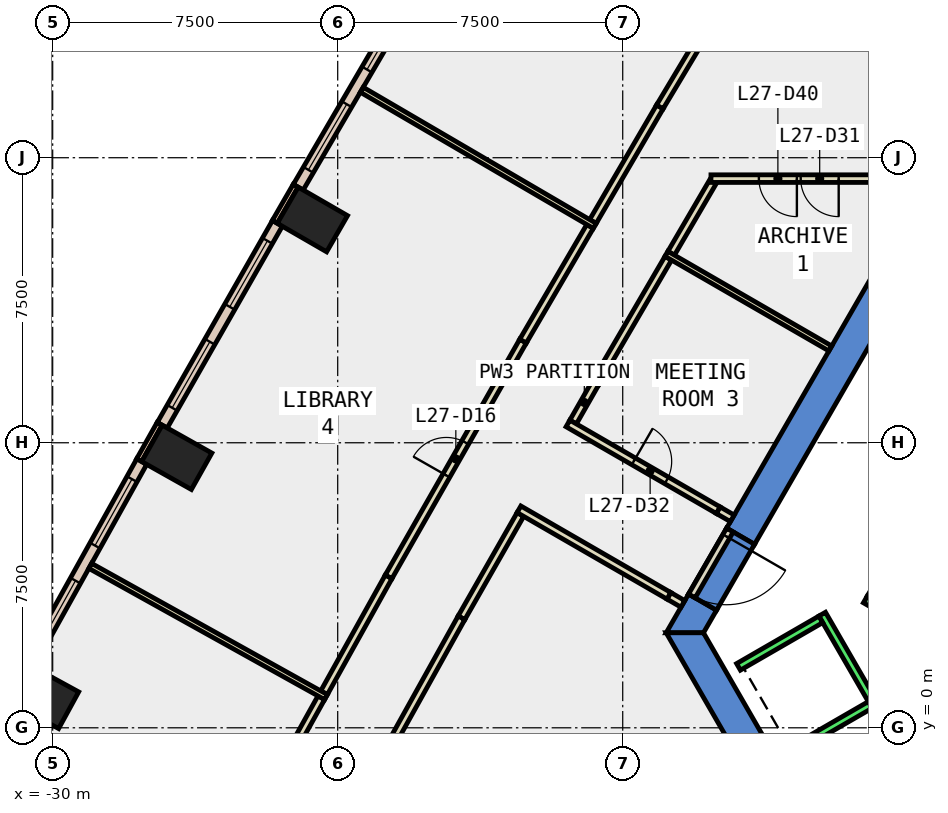
"""IFC4 building model, lengths in metres.
Left out: names, types, materials, properties, quantities, classifications, styles, units other than length and angle.
Written with IfcOpenShell. Run it as: python <this file> out.ifc"""

import sys

from ifc_helpers import new_model, si_unit, direction, frame, frame_2d, origin, origin_2d, place, context, subcontext, project, spatial, polyline, rectangle, outline, extrude, element, fill, save


model = new_model("IFC4")
c1 = context("Model", 3, precision=1e-05, world=origin(), true_north=direction((0.0, 1.0)))
c2 = subcontext(c1, "Body", "Model", "MODEL_VIEW")
j1 = project(units=[si_unit("LENGTHUNIT", "METRE"), si_unit("PLANEANGLEUNIT", "RADIAN")], contexts=[c1])
p1 = place(None, origin())
s1 = spatial("IfcSite", under=j1, at=p1, CompositionType="ELEMENT")
p2 = place(p1, origin())
s2 = spatial("IfcBuilding", under=s1, at=p2, CompositionType="ELEMENT")
p3 = place(p2, frame((0.0, 0.0, 124.4)))
s3 = spatial("IfcBuildingStorey", under=s2, at=p3, CompositionType="ELEMENT", Elevation=124.4)
for number, where, z_axis, x_axis in (
    (1, (-23.166, 13.375, -0.4), (0.0, 0.0, 1.0), (0.5, 0.866, 0.0)),
    (2, (-26.735, 7.117, -0.4), (0.0, 0.0, 1.0), (0.49, 0.872, 0.0)),
    (3, (-30.238, 0.822, -0.4), (0.0, 0.0, 1.0), (0.48, 0.877, 0.0)),
):
    element("IfcColumn", number, at=place(p3, frame(where, z_axis=z_axis, x_axis=x_axis)), inside=s3, PredefinedType="COLUMN", context=c2, shape_type="SweptSolid", body=[
        extrude(rectangle(XDim=1.1, YDim=1.5, at=origin_2d()), origin(), (0.0, 0.0, 1.0), 4.2),
    ])
p4 = place(p3, frame((0.0, 0.0, -0.4)))
e4 = element("IfcWall", 4, at=p4, inside=s3, PredefinedType="SHEAR", context=c2, shape_type="SweptSolid", body=[
    extrude(outline(polyline([(-12.267, 5.252), (-11.531, 4.827), (-6.437, 13.65), (-6.928, 14.5), (-12.267, 5.252)])), origin(), (0.0, 0.0, 1.0), 4.2),
])
p5 = place(p3, frame((0.0, 0.0, -0.4)))
e5 = element("IfcWall", 5, at=p5, inside=s3, PredefinedType="SHEAR", context=c2, shape_type="SweptSolid", body=[
    extrude(outline(polyline([(-12.531, 3.095), (-13.267, 3.52), (-13.856, 2.5), (-12.875, 2.5), (-12.531, 3.095)])), origin(), (0.0, 0.0, 1.0), 4.2),
])
p6 = place(p3, frame((0.0, 0.0, 3.6)))
e6 = element("IfcWall", 6, at=p6, inside=s3, PredefinedType="SHEAR", context=c2, shape_type="SweptSolid", body=[
    extrude(outline(polyline([(-13.267, 3.52), (-12.531, 3.095), (-11.531, 4.827), (-12.267, 5.252), (-13.267, 3.52)])), origin(), (0.0, 0.0, 1.0), 0.2),
])
p7 = place(p3, frame((0.0, 0.0, -0.4)))
e7 = element("IfcWall", 7, at=p7, inside=s3, PredefinedType="SHEAR", context=c2, shape_type="SweptSolid", body=[
    extrude(outline(polyline([(-13.856, 2.5), (-6.928, -9.5), (-6.437, -8.65), (-12.875, 2.5), (-13.856, 2.5)])), origin(), (0.0, 0.0, 1.0), 4.2),
])
p8 = place(p3, frame((-23.605, 14.264, 0.0), z_axis=(0.0, 0.0, 1.0), x_axis=(-0.499933745558, -0.866063652425, 0.0)))
e8 = element("IfcWall", 8, at=p8, inside=s3, PredefinedType="STANDARD", context=c2, shape_type="SweptSolid", body=[
    extrude(rectangle(XDim=1.1, YDim=0.15, at=frame_2d((0.55, 0.0))), origin(), (0.0, 0.0, 1.0), 3.8),
])
p9 = place(p3, frame((-27.185, 8.001, 0.0), z_axis=(0.0, 0.0, 1.0), x_axis=(-0.490008344094, -0.871717742574, 0.0)))
e9 = element("IfcWall", 9, at=p9, inside=s3, PredefinedType="STANDARD", context=c2, shape_type="SweptSolid", body=[
    extrude(rectangle(XDim=1.1, YDim=0.15, at=frame_2d((0.55, 0.0))), origin(), (0.0, 0.0, 1.0), 3.8),
])
p10 = place(p3, frame((-20.454, 19.503, 0.0), z_axis=(0.0, 0.0, 1.0), x_axis=(-0.504441987427, -0.863445586775, 0.0)))
e10 = element("IfcWall", 10, at=p10, inside=s3, PredefinedType="STANDARD", context=c2, shape_type="SweptSolid", body=[
    extrude(rectangle(XDim=6.114, YDim=0.3, at=frame_2d((3.057, 0.0))), origin(), (0.0, 0.0, 1.0), 3.8),
])
p11 = place(p10, frame((0.528, 0.0, 0.9)))
e11 = element("IfcOpeningElement", 11, at=p11, cuts=e10, PredefinedType="OPENING", context=c2, shape_type="SweptSolid", body=[
    extrude(rectangle(XDim=2.0, YDim=2.6, at=frame_2d((1.0, 1.3))), frame((0.0, 0.16, 0.0), z_axis=(0.0, -1.0, 0.0), x_axis=(1.0, 0.0, 0.0)), (0.0, 0.0, 1.0), 0.32),
])
p12 = place(p10, frame((3.585, 0.0, 0.9)))
e12 = element("IfcOpeningElement", 12, at=p12, cuts=e10, PredefinedType="OPENING", context=c2, shape_type="SweptSolid", body=[
    extrude(rectangle(XDim=2.0, YDim=2.6, at=frame_2d((1.0, 1.3))), frame((0.0, 0.16, 0.0), z_axis=(0.0, -1.0, 0.0), x_axis=(1.0, 0.0, 0.0)), (0.0, 0.0, 1.0), 0.32),
])
p13 = place(p3, frame((-24.087, 13.273, 0.0), z_axis=(0.0, 0.0, 1.0), x_axis=(-0.495472401298, -0.868623681206, 0.0)))
e13 = element("IfcWall", 13, at=p13, inside=s3, PredefinedType="STANDARD", context=c2, shape_type="SweptSolid", body=[
    extrude(rectangle(XDim=6.115, YDim=0.3, at=frame_2d((3.058, 0.0))), origin(), (0.0, 0.0, 1.0), 3.8),
])
p14 = place(p13, frame((0.529, 0.0, 0.9)))
e14 = element("IfcOpeningElement", 14, at=p14, cuts=e13, PredefinedType="OPENING", context=c2, shape_type="SweptSolid", body=[
    extrude(rectangle(XDim=2.0, YDim=2.6, at=frame_2d((1.0, 1.3))), frame((0.0, 0.16, 0.0), z_axis=(0.0, -1.0, 0.0), x_axis=(1.0, 0.0, 0.0)), (0.0, 0.0, 1.0), 0.32),
])
p15 = place(p13, frame((3.587, 0.0, 0.9)))
e15 = element("IfcOpeningElement", 15, at=p15, cuts=e13, PredefinedType="OPENING", context=c2, shape_type="SweptSolid", body=[
    extrude(rectangle(XDim=2.0, YDim=2.6, at=frame_2d((1.0, 1.3))), frame((0.0, 0.16, 0.0), z_axis=(0.0, -1.0, 0.0), x_axis=(1.0, 0.0, 0.0)), (0.0, 0.0, 1.0), 0.32),
])
p16 = place(p3, frame((-27.656, 7.005, 0.0), z_axis=(0.0, 0.0, 1.0), x_axis=(-0.486229342917, -0.873831234327, 0.0)))
e16 = element("IfcWall", 16, at=p16, inside=s3, PredefinedType="STANDARD", context=c2, shape_type="SweptSolid", body=[
    extrude(rectangle(XDim=6.114, YDim=0.3, at=frame_2d((3.057, 0.0))), origin(), (0.0, 0.0, 1.0), 3.8),
])
p17 = place(p16, frame((0.529, 0.0, 0.9)))
e17 = element("IfcOpeningElement", 17, at=p17, cuts=e16, PredefinedType="OPENING", context=c2, shape_type="SweptSolid", body=[
    extrude(rectangle(XDim=2.0, YDim=2.6, at=frame_2d((1.0, 1.3))), frame((0.0, 0.16, 0.0), z_axis=(0.0, -1.0, 0.0), x_axis=(1.0, 0.0, 0.0)), (0.0, 0.0, 1.0), 0.32),
])
p18 = place(p16, frame((3.586, 0.0, 0.9)))
e18 = element("IfcOpeningElement", 18, at=p18, cuts=e16, PredefinedType="OPENING", context=c2, shape_type="SweptSolid", body=[
    extrude(rectangle(XDim=2.0, YDim=2.6, at=frame_2d((1.0, 1.3))), frame((0.0, 0.16, 0.0), z_axis=(0.0, -1.0, 0.0), x_axis=(1.0, 0.0, 0.0)), (0.0, 0.0, 1.0), 0.32),
])
p19 = place(p3, frame((-12.628, 14.364, 0.0), z_axis=(0.0, 0.0, 1.0), x_axis=(-0.504457175129, -0.863436713639, 0.0)))
e19 = element("IfcWall", 19, at=p19, inside=s3, PredefinedType="PARTITIONING", context=c2, shape_type="SweptSolid", body=[
    extrude(rectangle(XDim=2.175, YDim=0.2, at=frame_2d((1.087, 0.0))), origin(), (0.0, 0.0, 1.0), 3.8),
])
p20 = place(p3, frame((-13.801, 12.356, 0.0), z_axis=(0.0, 0.0, 1.0), x_axis=(-0.504282474222, -0.863538757782, 0.0)))
e20 = element("IfcWall", 20, at=p20, inside=s3, PredefinedType="PARTITIONING", context=c2, shape_type="SweptSolid", body=[
    extrude(rectangle(XDim=3.8, YDim=0.2, at=frame_2d((1.9, 0.0))), origin(), (0.0, 0.0, 1.0), 3.8),
])
p21 = place(p3, frame((-15.717, 9.075, 0.0), z_axis=(0.0, 0.0, 1.0), x_axis=(-0.495695496657, -0.868496387208, 0.0)))
e21 = element("IfcWall", 21, at=p21, inside=s3, PredefinedType="PARTITIONING", context=c2, shape_type="SweptSolid", body=[
    extrude(rectangle(XDim=1.186, YDim=0.2, at=frame_2d((0.593, 0.0))), origin(), (0.0, 0.0, 1.0), 3.8),
])
p22 = place(p3, frame((-16.441, 8.008, 0.0), z_axis=(0.0, 0.0, 1.0), x_axis=(0.866020923391, -0.500007760188, 0.0)))
e22 = element("IfcWall", 22, at=p22, inside=s3, PredefinedType="PARTITIONING", context=c2, shape_type="SweptSolid", body=[
    extrude(rectangle(XDim=4.568, YDim=0.2, at=frame_2d((2.284, 0.0))), origin(), (0.0, 0.0, 1.0), 3.8),
])
p23 = place(p22, frame((1.997, 0.0, 0.0)))
e23 = element("IfcOpeningElement", 23, at=p23, cuts=e22, PredefinedType="OPENING", context=c2, shape_type="SweptSolid", body=[
    extrude(rectangle(XDim=1.0, YDim=2.1, at=frame_2d((0.5, 1.05))), frame((0.0, 0.11, 0.0), z_axis=(0.0, -1.0, 0.0), x_axis=(1.0, 0.0, 0.0)), (0.0, 0.0, 1.0), 0.22),
])
p24 = place(p3, frame((-13.417, 3.26, 0.0), z_axis=(0.0, 0.0, 1.0), x_axis=(-0.865544229481, 0.500832493767, 0.0)))
e24 = element("IfcWall", 24, at=p24, inside=s3, PredefinedType="PARTITIONING", context=c2, shape_type="SweptSolid", body=[
    extrude(rectangle(XDim=0.425, YDim=0.2, at=frame_2d((0.212, 0.0))), origin(), (0.0, 0.0, 1.0), 2.4),
])
p25 = place(p3, frame((-17.692, 5.613, 0.0), z_axis=(0.0, 0.0, 1.0), x_axis=(-0.495492055461, -0.868612469963, 0.0)))
e25 = element("IfcWall", 25, at=p25, inside=s3, PredefinedType="PARTITIONING", context=c2, shape_type="SweptSolid", body=[
    extrude(rectangle(XDim=3.13, YDim=0.2, at=frame_2d((1.565, 0.0))), origin(), (0.0, 0.0, 1.0), 3.8),
])
p26 = place(p3, frame((-19.243, 2.894, 0.0), z_axis=(0.0, 0.0, 1.0), x_axis=(-0.486304341235, -0.873789498504, 0.0)))
e26 = element("IfcWall", 26, at=p26, inside=s3, PredefinedType="PARTITIONING", context=c2, shape_type="SweptSolid", body=[
    extrude(rectangle(XDim=7.113, YDim=0.2, at=frame_2d((3.556, 0.0))), origin(), (0.0, 0.0, 1.0), 3.8),
])
p27 = place(p3, frame((-15.784, 13.322, 0.0), z_axis=(0.0, 0.0, 1.0), x_axis=(0.50424043703, 0.863563304954, 0.0)))
e27 = element("IfcWall", 27, at=p27, inside=s3, PredefinedType="PARTITIONING", context=c2, shape_type="SweptSolid", body=[
    extrude(rectangle(XDim=3.492, YDim=0.2, at=frame_2d((1.746, 0.0))), origin(), (0.0, 0.0, 1.0), 3.8),
])
p28 = place(p3, frame((-14.023, 16.338, 0.0), z_axis=(0.0, 0.0, 1.0), x_axis=(0.513773581048, 0.857925816966, 0.0)))
e28 = element("IfcWall", 28, at=p28, inside=s3, PredefinedType="PARTITIONING", context=c2, shape_type="SweptSolid", body=[
    extrude(rectangle(XDim=7.061, YDim=0.2, at=frame_2d((3.531, 0.0))), origin(), (0.0, 0.0, 1.0), 3.8),
])
p29 = place(p28, frame((3.106, 0.0, 0.0)))
e29 = element("IfcOpeningElement", 29, at=p29, cuts=e28, PredefinedType="OPENING", context=c2, shape_type="SweptSolid", body=[
    extrude(rectangle(XDim=1.0, YDim=2.1, at=frame_2d((0.5, 1.05))), frame((0.0, 0.11, 0.0), z_axis=(0.0, -1.0, 0.0), x_axis=(1.0, 0.0, 0.0)), (0.0, 0.0, 1.0), 0.22),
])
p30 = place(p3, frame((-22.859, 0.922, 0.0), z_axis=(0.0, 0.0, 1.0), x_axis=(0.486390484578, 0.873741550181, 0.0)))
e30 = element("IfcWall", 30, at=p30, inside=s3, PredefinedType="PARTITIONING", context=c2, shape_type="SweptSolid", body=[
    extrude(rectangle(XDim=3.493, YDim=0.2, at=frame_2d((1.747, 0.0))), origin(), (0.0, 0.0, 1.0), 3.8),
])
p31 = place(p3, frame((-21.16, 3.974, 0.0), z_axis=(0.0, 0.0, 1.0), x_axis=(0.495450054309, 0.868636427791, 0.0)))
e31 = element("IfcWall", 31, at=p31, inside=s3, PredefinedType="PARTITIONING", context=c2, shape_type="SweptSolid", body=[
    extrude(rectangle(XDim=7.139, YDim=0.2, at=frame_2d((3.569, 0.0))), origin(), (0.0, 0.0, 1.0), 3.8),
])
p32 = place(p31, frame((3.069, 0.0, 0.0)))
e32 = element("IfcOpeningElement", 32, at=p32, cuts=e31, PredefinedType="OPENING", context=c2, shape_type="SweptSolid", body=[
    extrude(rectangle(XDim=1.0, YDim=2.1, at=frame_2d((0.5, 1.05))), frame((0.0, 0.11, 0.0), z_axis=(0.0, -1.0, 0.0), x_axis=(1.0, 0.0, 0.0)), (0.0, 0.0, 1.0), 0.22),
])
p33 = place(p3, frame((-17.623, 10.175, 0.0), z_axis=(0.0, 0.0, 1.0), x_axis=(0.504383407959, 0.863479807393, 0.0)))
e33 = element("IfcWall", 33, at=p33, inside=s3, PredefinedType="PARTITIONING", context=c2, shape_type="SweptSolid", body=[
    extrude(rectangle(XDim=3.495, YDim=0.2, at=frame_2d((1.748, 0.0))), origin(), (0.0, 0.0, 1.0), 3.8),
])
p34 = place(p3, frame((-24.63, -2.262, 0.0), z_axis=(0.0, 0.0, 1.0), x_axis=(0.486058237491, 0.873926421255, 0.0)))
e34 = element("IfcWall", 34, at=p34, inside=s3, PredefinedType="PARTITIONING", context=c2, shape_type="SweptSolid", body=[
    extrude(rectangle(XDim=3.493, YDim=0.2, at=frame_2d((1.747, 0.0))), origin(), (0.0, 0.0, 1.0), 3.8),
])
p35 = place(p3, frame((-9.537, 9.981, 0.0), z_axis=(0.0, 0.0, 1.0), x_axis=(-0.866035377451, 0.499982724704, 0.0)))
e35 = element("IfcWall", 35, at=p35, inside=s3, PredefinedType="PARTITIONING", context=c2, shape_type="SweptSolid", body=[
    extrude(rectangle(XDim=4.98, YDim=0.15, at=frame_2d((2.49, 0.0))), origin(), (0.0, 0.0, 1.0), 3.8),
])
p36 = place(p3, frame((-6.957, 14.45, 0.0), z_axis=(0.0, 0.0, 1.0), x_axis=(-1.0, 0.0, 0.0)))
e36 = element("IfcWall", 36, at=p36, inside=s3, PredefinedType="PARTITIONING", context=c2, shape_type="SweptSolid", body=[
    extrude(rectangle(XDim=5.721, YDim=0.2, at=frame_2d((2.86, 0.0))), origin(), (0.0, 0.0, 1.0), 3.8),
])
p37 = place(p36, frame((2.36, 0.0, 0.0)))
e37 = element("IfcOpeningElement", 37, at=p37, cuts=e36, PredefinedType="OPENING", context=c2, shape_type="SweptSolid", body=[
    extrude(rectangle(XDim=1.0, YDim=2.1, at=frame_2d((0.5, 1.05))), frame((0.0, 0.11, 0.0), z_axis=(0.0, -1.0, 0.0), x_axis=(1.0, 0.0, 0.0)), (0.0, 0.0, 1.0), 0.22),
])
p38 = place(p36, frame((3.46, 0.0, 0.0)))
e38 = element("IfcOpeningElement", 38, at=p38, cuts=e36, PredefinedType="OPENING", context=c2, shape_type="SweptSolid", body=[
    extrude(rectangle(XDim=1.0, YDim=2.1, at=frame_2d((0.5, 1.05))), frame((0.0, 0.11, 0.0), z_axis=(0.0, -1.0, 0.0), x_axis=(1.0, 0.0, 0.0)), (0.0, 0.0, 1.0), 0.22),
])
p39 = place(p3, frame((-15.736, 13.207, 0.0), z_axis=(0.0, 0.0, 1.0), x_axis=(-0.863454426155, 0.504426856892, 0.0)))
e39 = element("IfcWall", 39, at=p39, inside=s3, PredefinedType="PARTITIONING", context=c2, shape_type="SweptSolid", body=[
    extrude(rectangle(XDim=7.099, YDim=0.15, at=frame_2d((3.55, 0.0))), origin(), (0.0, 0.0, 1.0), 3.8),
])
p40 = place(p3, frame((-22.808, 0.808, 0.0), z_axis=(0.0, 0.0, 1.0), x_axis=(-0.873839159938, 0.486215099066, 0.0)))
e40 = element("IfcWall", 40, at=p40, inside=s3, PredefinedType="PARTITIONING", context=c2, shape_type="SweptSolid", body=[
    extrude(rectangle(XDim=7.1, YDim=0.15, at=frame_2d((3.55, 0.0))), origin(), (0.0, 0.0, 1.0), 3.8),
])
p41 = place(p3, frame((-12.18, 5.202, 0.0), z_axis=(0.0, 0.0, 1.0), x_axis=(-0.50002537861, -0.866010750942, 0.0)))
e41 = element("IfcWall", 41, at=p41, inside=s3, PredefinedType="PARTITIONING", context=c2, shape_type="SweptSolid", body=[
    extrude(rectangle(XDim=2.0, YDim=0.2, at=frame_2d((1.0, 0.0))), origin(), (0.0, 0.0, 1.0), 2.4),
])
p42 = place(p41, frame((0.19, 0.0, 0.0)))
e42 = element("IfcOpeningElement", 42, at=p42, cuts=e41, PredefinedType="OPENING", context=c2, shape_type="SweptSolid", body=[
    extrude(rectangle(XDim=1.8, YDim=2.1, at=frame_2d((0.9, 1.05))), frame((0.0, 0.11, 0.0), z_axis=(0.0, -1.0, 0.0), x_axis=(1.0, 0.0, 0.0)), (0.0, 0.0, 1.0), 0.22),
])
p43 = place(p3, frame((-12.485, 5.724, 0.0), z_axis=(0.0, 0.0, 1.0), x_axis=(0.866434177787, -0.499291313327, 0.0)))
e43 = element("IfcWall", 43, at=p43, inside=s3, PredefinedType="PARTITIONING", context=c2, shape_type="SweptSolid", body=[
    extrude(rectangle(XDim=0.425, YDim=0.2, at=frame_2d((0.212, 0.0))), origin(), (0.0, 0.0, 1.0), 2.4),
])
p44 = place(p3, frame((-13.785, 3.473, 0.0), z_axis=(0.0, 0.0, 1.0), x_axis=(-0.866081168121, 0.499903400895, 0.0)))
e44 = element("IfcWall", 44, at=p44, inside=s3, PredefinedType="PARTITIONING", context=c2, shape_type="SweptSolid", body=[
    extrude(rectangle(XDim=4.555, YDim=0.2, at=frame_2d((2.278, 0.0))), origin(), (0.0, 0.0, 1.0), 3.8),
])
p45 = place(p3, frame((-9.751, 2.99, 0.0), z_axis=(0.0, 0.0, 1.0), x_axis=(0.50000090737, -0.866024879913, 0.0)))
e45 = element("IfcWall", 45, at=p45, inside=s3, PredefinedType="STANDARD", context=c2, shape_type="SweptSolid", body=[
    extrude(rectangle(XDim=10.6, YDim=0.2, at=frame_2d((5.3, 0.0))), origin(), (0.0, 0.0, 1.0), 3.8),
])
p46 = place(p3, frame((-9.788, 2.853, 0.0), z_axis=(0.0, 0.0, 1.0), x_axis=(-0.865998541277, -0.500046524342, 0.0)))
e46 = element("IfcWall", 46, at=p46, inside=s3, PredefinedType="STANDARD", context=c2, shape_type="SweptSolid", body=[
    extrude(rectangle(XDim=2.5, YDim=0.2, at=frame_2d((1.25, 0.0))), origin(), (0.0, 0.0, 1.0), 3.8),
])
p47 = place(p3, frame((-8.488, 0.602, 0.0), z_axis=(0.0, 0.0, 1.0), x_axis=(-0.866022959057, -0.500004234368, 0.0)))
e47 = element("IfcWall", 47, at=p47, inside=s3, PredefinedType="STANDARD", context=c2, shape_type="SweptSolid", body=[
    extrude(rectangle(XDim=2.5, YDim=0.2, at=frame_2d((1.25, 0.0))), origin(), (0.0, 0.0, 1.0), 3.8),
])
p48 = place(p3, frame((-6.25, 2.01, 0.0), z_axis=(0.0, 0.0, 1.0), x_axis=(-0.86611865017, 0.499838457731, 0.0)))
e48 = element("IfcWall", 48, at=p48, inside=s3, PredefinedType="STANDARD", context=c2, shape_type="SweptSolid", body=[
    extrude(rectangle(XDim=2.733, YDim=0.2, at=frame_2d((1.366, 0.0))), origin(), (0.0, 0.0, 1.0), 3.8),
])
p49 = place(p3, frame((-5.03, 9.388, 0.0), z_axis=(0.0, 0.0, 1.0), x_axis=(-0.499978703459, -0.866037698999, 0.0)))
e49 = element("IfcWall", 49, at=p49, inside=s3, PredefinedType="STANDARD", context=c2, shape_type="SweptSolid", body=[
    extrude(rectangle(XDim=6.9, YDim=0.2, at=frame_2d((3.45, 0.0))), origin(), (0.0, 0.0, 1.0), 3.8),
])
p50 = place(p11, origin())
e50 = element("IfcWindow", 50, at=p50, inside=s3, PartitioningType="SINGLE_PANEL", PredefinedType="WINDOW", context=c2, shape_type="SweptSolid", body=[
    extrude(rectangle(XDim=2.0, YDim=2.6, at=frame_2d((1.0, 1.3))), frame((0.0, 0.03, 0.0), z_axis=(0.0, -1.0, 0.0), x_axis=(1.0, 0.0, 0.0)), (0.0, 0.0, 1.0), 0.06),
])
fill(e11, e50)
p51 = place(p12, origin())
e51 = element("IfcWindow", 51, at=p51, inside=s3, PartitioningType="SINGLE_PANEL", PredefinedType="WINDOW", context=c2, shape_type="SweptSolid", body=[
    extrude(rectangle(XDim=2.0, YDim=2.6, at=frame_2d((1.0, 1.3))), frame((0.0, 0.03, 0.0), z_axis=(0.0, -1.0, 0.0), x_axis=(1.0, 0.0, 0.0)), (0.0, 0.0, 1.0), 0.06),
])
fill(e12, e51)
p52 = place(p14, origin())
e52 = element("IfcWindow", 52, at=p52, inside=s3, PartitioningType="SINGLE_PANEL", PredefinedType="WINDOW", context=c2, shape_type="SweptSolid", body=[
    extrude(rectangle(XDim=2.0, YDim=2.6, at=frame_2d((1.0, 1.3))), frame((0.0, 0.03, 0.0), z_axis=(0.0, -1.0, 0.0), x_axis=(1.0, 0.0, 0.0)), (0.0, 0.0, 1.0), 0.06),
])
fill(e14, e52)
p53 = place(p15, origin())
e53 = element("IfcWindow", 53, at=p53, inside=s3, PartitioningType="SINGLE_PANEL", PredefinedType="WINDOW", context=c2, shape_type="SweptSolid", body=[
    extrude(rectangle(XDim=2.0, YDim=2.6, at=frame_2d((1.0, 1.3))), frame((0.0, 0.03, 0.0), z_axis=(0.0, -1.0, 0.0), x_axis=(1.0, 0.0, 0.0)), (0.0, 0.0, 1.0), 0.06),
])
fill(e15, e53)
p54 = place(p17, origin())
e54 = element("IfcWindow", 54, at=p54, inside=s3, PartitioningType="SINGLE_PANEL", PredefinedType="WINDOW", context=c2, shape_type="SweptSolid", body=[
    extrude(rectangle(XDim=2.0, YDim=2.6, at=frame_2d((1.0, 1.3))), frame((0.0, 0.03, 0.0), z_axis=(0.0, -1.0, 0.0), x_axis=(1.0, 0.0, 0.0)), (0.0, 0.0, 1.0), 0.06),
])
fill(e17, e54)
p55 = place(p18, origin())
e55 = element("IfcWindow", 55, at=p55, inside=s3, PartitioningType="SINGLE_PANEL", PredefinedType="WINDOW", context=c2, shape_type="SweptSolid", body=[
    extrude(rectangle(XDim=2.0, YDim=2.6, at=frame_2d((1.0, 1.3))), frame((0.0, 0.03, 0.0), z_axis=(0.0, -1.0, 0.0), x_axis=(1.0, 0.0, 0.0)), (0.0, 0.0, 1.0), 0.06),
])
fill(e18, e55)
p56 = place(p32, origin())
e56 = element("IfcDoor", 56, at=p56, inside=s3, OperationType="SINGLE_SWING_LEFT", PredefinedType="DOOR", context=c2, shape_type="SweptSolid", body=[
    extrude(rectangle(XDim=1.0, YDim=2.1, at=frame_2d((0.5, 1.05))), frame((0.0, 0.025, 0.0), z_axis=(0.0, -1.0, 0.0), x_axis=(1.0, 0.0, 0.0)), (0.0, 0.0, 1.0), 0.05),
])
fill(e32, e56)
p57 = place(p37, origin())
e57 = element("IfcDoor", 57, at=p57, inside=s3, OperationType="SINGLE_SWING_LEFT", PredefinedType="DOOR", context=c2, shape_type="SweptSolid", body=[
    extrude(rectangle(XDim=1.0, YDim=2.1, at=frame_2d((0.5, 1.05))), frame((0.0, 0.025, 0.0), z_axis=(0.0, -1.0, 0.0), x_axis=(1.0, 0.0, 0.0)), (0.0, 0.0, 1.0), 0.05),
])
fill(e37, e57)
p58 = place(p23, origin())
e58 = element("IfcDoor", 58, at=p58, inside=s3, OperationType="SINGLE_SWING_LEFT", PredefinedType="DOOR", context=c2, shape_type="SweptSolid", body=[
    extrude(rectangle(XDim=1.0, YDim=2.1, at=frame_2d((0.5, 1.05))), frame((0.0, 0.025, 0.0), z_axis=(0.0, -1.0, 0.0), x_axis=(1.0, 0.0, 0.0)), (0.0, 0.0, 1.0), 0.05),
])
fill(e23, e58)
p59 = place(p38, origin())
e59 = element("IfcDoor", 59, at=p59, inside=s3, OperationType="SINGLE_SWING_RIGHT", PredefinedType="DOOR", context=c2, shape_type="SweptSolid", body=[
    extrude(rectangle(XDim=1.0, YDim=2.1, at=frame_2d((0.5, 1.05))), frame((0.0, 0.025, 0.0), z_axis=(0.0, -1.0, 0.0), x_axis=(1.0, 0.0, 0.0)), (0.0, 0.0, 1.0), 0.05),
])
fill(e38, e59)
p60 = place(p42, origin())
e60 = element("IfcDoor", 60, at=p60, inside=s3, OperationType="DOUBLE_DOOR_SINGLE_SWING", PredefinedType="DOOR", context=c2, shape_type="SweptSolid", body=[
    extrude(rectangle(XDim=1.8, YDim=2.1, at=frame_2d((0.9, 1.05))), frame((0.0, 0.025, 0.0), z_axis=(0.0, -1.0, 0.0), x_axis=(1.0, 0.0, 0.0)), (0.0, 0.0, 1.0), 0.05),
])
fill(e42, e60)
save(model, sys.argv[1])
